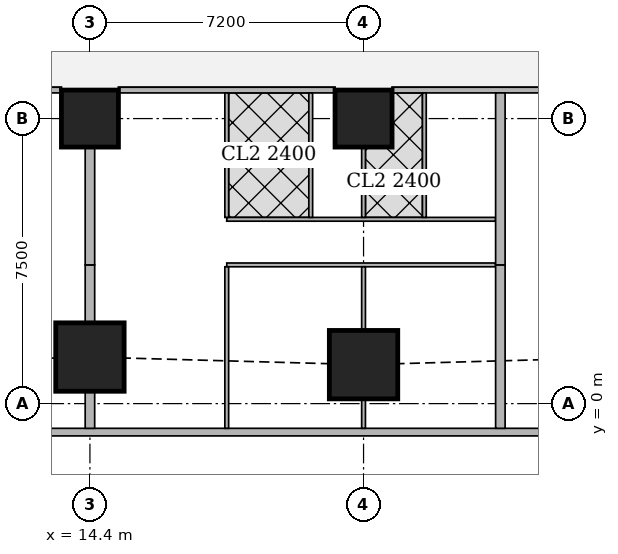
"""IFC4 building model, lengths in metres.
Left out: names, types, materials, properties, quantities, classifications, styles, units other than length and angle.
Written with IfcOpenShell. Run it as: python <this file> out.ifc"""

import sys

from ifc_helpers import new_model, si_unit, direction, frame, frame_2d, origin, origin_2d, place, context, subcontext, project, spatial, rectangle, extrude, element, fill, save


model = new_model("IFC4")
c1 = context("Model", 3, precision=1e-05, world=origin(), true_north=direction((0.0, 1.0)))
c2 = subcontext(c1, "Body", "Model", "MODEL_VIEW")
j1 = project(units=[si_unit("LENGTHUNIT", "METRE"), si_unit("PLANEANGLEUNIT", "RADIAN")], contexts=[c1])
p1 = place(None, origin())
s1 = spatial("IfcSite", under=j1, at=p1, CompositionType="ELEMENT")
p2 = place(p1, origin())
s2 = spatial("IfcBuilding", under=s1, at=p2, CompositionType="ELEMENT")
p3 = place(p2, frame((0.0, 0.0, 147.05)))
s3 = spatial("IfcBuildingStorey", under=s2, at=p3, CompositionType="ELEMENT", Elevation=147.05)
for number, where, z_axis, x_axis in (
    (1, (14.4, 1.225, 0.0), (0.0, 0.0, 1.0), (1.0, 0.0, 0.0)),
    (2, (21.6, 1.025, 0.0), (0.0, 0.0, 1.0), (1.0, 0.0, 0.0)),
):
    element("IfcColumn", number, at=place(p3, frame(where, z_axis=z_axis, x_axis=x_axis)), inside=s3, PredefinedType="COLUMN", context=c2, shape_type="SweptSolid", body=[
        extrude(rectangle(XDim=1.8, YDim=1.8, at=origin_2d()), origin(), (0.0, 0.0, 1.0), 3.75),
    ])
for number, where, z_axis, x_axis in (
    (3, (14.4, 7.5, 0.0), (0.0, 0.0, 1.0), (1.0, 0.0, 0.0)),
    (4, (21.6, 7.5, 0.0), (0.0, 0.0, 1.0), (1.0, 0.0, 0.0)),
):
    element("IfcColumn", number, at=place(p3, frame(where, z_axis=z_axis, x_axis=x_axis)), inside=s3, PredefinedType="COLUMN", context=c2, shape_type="SweptSolid", body=[
        extrude(rectangle(XDim=1.5, YDim=1.5, at=origin_2d()), origin(), (0.0, 0.0, 1.0), 3.75),
    ])
p4 = place(p3, frame((2.163, -0.75, 0.0), z_axis=(0.0, 0.0, 1.0), x_axis=(1.0, 0.0, 0.0)))
e5 = element("IfcWall", 5, at=p4, inside=s3, PredefinedType="SOLIDWALL", context=c2, shape_type="SweptSolid", body=[
    extrude(rectangle(XDim=45.628, YDim=0.2, at=frame_2d((22.814, 0.0))), origin(), (0.0, 0.0, 1.0), 3.5),
])
p5 = place(p4, frame((9.537, 0.0, 0.9)))
e6 = element("IfcOpeningElement", 6, at=p5, cuts=e5, PredefinedType="OPENING", context=c2, shape_type="SweptSolid", body=[
    extrude(rectangle(XDim=1.8, YDim=1.5, at=frame_2d((0.9, 0.75))), frame((0.0, 0.11, 0.0), z_axis=(0.0, -1.0, 0.0), x_axis=(1.0, 0.0, 0.0)), (0.0, 0.0, 1.0), 0.22),
])
p6 = place(p4, frame((13.137, 0.0, 0.9)))
e7 = element("IfcOpeningElement", 7, at=p6, cuts=e5, PredefinedType="OPENING", context=c2, shape_type="SweptSolid", body=[
    extrude(rectangle(XDim=1.8, YDim=1.5, at=frame_2d((0.9, 0.75))), frame((0.0, 0.11, 0.0), z_axis=(0.0, -1.0, 0.0), x_axis=(1.0, 0.0, 0.0)), (0.0, 0.0, 1.0), 0.22),
])
p7 = place(p4, frame((16.737, 0.0, 0.9)))
e8 = element("IfcOpeningElement", 8, at=p7, cuts=e5, PredefinedType="OPENING", context=c2, shape_type="SweptSolid", body=[
    extrude(rectangle(XDim=1.8, YDim=1.5, at=frame_2d((0.9, 0.75))), frame((0.0, 0.11, 0.0), z_axis=(0.0, -1.0, 0.0), x_axis=(1.0, 0.0, 0.0)), (0.0, 0.0, 1.0), 0.22),
])
p8 = place(p4, frame((20.337, 0.0, 0.9)))
e9 = element("IfcOpeningElement", 9, at=p8, cuts=e5, PredefinedType="OPENING", context=c2, shape_type="SweptSolid", body=[
    extrude(rectangle(XDim=1.8, YDim=1.5, at=frame_2d((0.9, 0.75))), frame((0.0, 0.11, 0.0), z_axis=(0.0, -1.0, 0.0), x_axis=(1.0, 0.0, 0.0)), (0.0, 0.0, 1.0), 0.22),
])
p9 = place(p4, frame((23.937, 0.0, 0.9)))
e10 = element("IfcOpeningElement", 10, at=p9, cuts=e5, PredefinedType="OPENING", context=c2, shape_type="SweptSolid", body=[
    extrude(rectangle(XDim=1.8, YDim=1.5, at=frame_2d((0.9, 0.75))), frame((0.0, 0.11, 0.0), z_axis=(0.0, -1.0, 0.0), x_axis=(1.0, 0.0, 0.0)), (0.0, 0.0, 1.0), 0.22),
])
p10 = place(p4, frame((27.537, 0.0, 0.9)))
e11 = element("IfcOpeningElement", 11, at=p10, cuts=e5, PredefinedType="OPENING", context=c2, shape_type="SweptSolid", body=[
    extrude(rectangle(XDim=1.8, YDim=1.5, at=frame_2d((0.9, 0.75))), frame((0.0, 0.11, 0.0), z_axis=(0.0, -1.0, 0.0), x_axis=(1.0, 0.0, 0.0)), (0.0, 0.0, 1.0), 0.22),
])
p11 = place(p4, frame((31.137, 0.0, 0.9)))
e12 = element("IfcOpeningElement", 12, at=p11, cuts=e5, PredefinedType="OPENING", context=c2, shape_type="SweptSolid", body=[
    extrude(rectangle(XDim=1.8, YDim=1.5, at=frame_2d((0.9, 0.75))), frame((0.0, 0.11, 0.0), z_axis=(0.0, -1.0, 0.0), x_axis=(1.0, 0.0, 0.0)), (0.0, 0.0, 1.0), 0.22),
])
p12 = place(p4, frame((34.737, 0.0, 0.9)))
e13 = element("IfcOpeningElement", 13, at=p12, cuts=e5, PredefinedType="OPENING", context=c2, shape_type="SweptSolid", body=[
    extrude(rectangle(XDim=1.8, YDim=1.5, at=frame_2d((0.9, 0.75))), frame((0.0, 0.11, 0.0), z_axis=(0.0, -1.0, 0.0), x_axis=(1.0, 0.0, 0.0)), (0.0, 0.0, 1.0), 0.22),
])
p13 = place(p3, frame((28.049, 8.25, 0.0), z_axis=(0.0, 0.0, 1.0), x_axis=(-1.0, 0.0, 0.0)))
e14 = element("IfcWall", 14, at=p13, inside=s3, PredefinedType="SOLIDWALL", context=c2, shape_type="SweptSolid", body=[
    extrude(rectangle(XDim=5.698, YDim=0.15, at=frame_2d((2.849, 0.0))), origin(), (0.0, 0.0, 1.0), 3.5),
])
p14 = place(p13, frame((0.749, 0.0, 0.0)))
e15 = element("IfcOpeningElement", 15, at=p14, cuts=e14, PredefinedType="OPENING", context=c2, shape_type="SweptSolid", body=[
    extrude(rectangle(XDim=1.0, YDim=2.1, at=frame_2d((0.5, 1.05))), frame((0.0, 0.085, 0.0), z_axis=(0.0, -1.0, 0.0), x_axis=(1.0, 0.0, 0.0)), (0.0, 0.0, 1.0), 0.17),
])
p15 = place(p3, frame((20.849, 8.25, 0.0), z_axis=(0.0, 0.0, 1.0), x_axis=(-1.0, 0.0, 0.0)))
e16 = element("IfcWall", 16, at=p15, inside=s3, PredefinedType="SOLIDWALL", context=c2, shape_type="SweptSolid", body=[
    extrude(rectangle(XDim=5.698, YDim=0.15, at=frame_2d((2.849, 0.0))), origin(), (0.0, 0.0, 1.0), 3.5),
])
p16 = place(p15, frame((3.949, 0.0, 0.0)))
e17 = element("IfcOpeningElement", 17, at=p16, cuts=e16, PredefinedType="OPENING", context=c2, shape_type="SweptSolid", body=[
    extrude(rectangle(XDim=1.0, YDim=2.1, at=frame_2d((0.5, 1.05))), frame((0.0, 0.085, 0.0), z_axis=(0.0, -1.0, 0.0), x_axis=(1.0, 0.0, 0.0)), (0.0, 0.0, 1.0), 0.17),
])
p17 = place(p3, frame((13.649, 8.25, 0.0), z_axis=(0.0, 0.0, 1.0), x_axis=(-1.0, 0.0, 0.0)))
e18 = element("IfcWall", 18, at=p17, inside=s3, PredefinedType="SOLIDWALL", context=c2, shape_type="SweptSolid", body=[
    extrude(rectangle(XDim=5.549, YDim=0.15, at=frame_2d((2.774, 0.0))), origin(), (0.0, 0.0, 1.0), 3.5),
])
p18 = place(p17, frame((0.81, 0.0, 0.0)))
e19 = element("IfcOpeningElement", 19, at=p18, cuts=e18, PredefinedType="OPENING", context=c2, shape_type="SweptSolid", body=[
    extrude(rectangle(XDim=1.0, YDim=2.1, at=frame_2d((0.5, 1.05))), frame((0.0, 0.085, 0.0), z_axis=(0.0, -1.0, 0.0), x_axis=(1.0, 0.0, 0.0)), (0.0, 0.0, 1.0), 0.17),
])
p19 = place(p3, frame((25.075, 3.65, 0.0), z_axis=(0.0, 0.0, 1.0), x_axis=(-1.0, 0.0, 0.0)))
e20 = element("IfcWall", 20, at=p19, inside=s3, PredefinedType="PARTITIONING", context=c2, shape_type="SweptSolid", body=[
    extrude(rectangle(XDim=7.075, YDim=0.1, at=frame_2d((3.538, 0.0))), origin(), (0.0, 0.0, 1.0), 3.5),
])
p20 = place(p19, frame((5.975, 0.0, 0.0)))
e21 = element("IfcOpeningElement", 21, at=p20, cuts=e20, PredefinedType="OPENING", context=c2, shape_type="SweptSolid", body=[
    extrude(rectangle(XDim=0.9, YDim=2.1, at=frame_2d((0.45, 1.05))), frame((0.0, 0.06, 0.0), z_axis=(0.0, -1.0, 0.0), x_axis=(1.0, 0.0, 0.0)), (0.0, 0.0, 1.0), 0.12),
])
p21 = place(p19, frame((2.375, 0.0, 0.0)))
e22 = element("IfcOpeningElement", 22, at=p21, cuts=e20, PredefinedType="OPENING", context=c2, shape_type="SweptSolid", body=[
    extrude(rectangle(XDim=0.9, YDim=2.1, at=frame_2d((0.45, 1.05))), frame((0.0, 0.06, 0.0), z_axis=(0.0, -1.0, 0.0), x_axis=(1.0, 0.0, 0.0)), (0.0, 0.0, 1.0), 0.12),
])
p22 = place(p3, frame((25.075, 4.85, 0.0), z_axis=(0.0, 0.0, 1.0), x_axis=(-1.0, 0.0, 0.0)))
e23 = element("IfcWall", 23, at=p22, inside=s3, PredefinedType="PARTITIONING", context=c2, shape_type="SweptSolid", body=[
    extrude(rectangle(XDim=7.075, YDim=0.1, at=frame_2d((3.538, 0.0))), origin(), (0.0, 0.0, 1.0), 3.5),
])
p23 = place(p22, frame((5.52, 0.0, 0.0)))
e24 = element("IfcOpeningElement", 24, at=p23, cuts=e23, PredefinedType="OPENING", context=c2, shape_type="SweptSolid", body=[
    extrude(rectangle(XDim=0.9, YDim=2.1, at=frame_2d((0.45, 1.05))), frame((0.0, 0.06, 0.0), z_axis=(0.0, -1.0, 0.0), x_axis=(1.0, 0.0, 0.0)), (0.0, 0.0, 1.0), 0.12),
])
p24 = place(p22, frame((2.225, 0.0, 0.0)))
e25 = element("IfcOpeningElement", 25, at=p24, cuts=e23, PredefinedType="OPENING", context=c2, shape_type="SweptSolid", body=[
    extrude(rectangle(XDim=0.9, YDim=2.1, at=frame_2d((0.45, 1.05))), frame((0.0, 0.06, 0.0), z_axis=(0.0, -1.0, 0.0), x_axis=(1.0, 0.0, 0.0)), (0.0, 0.0, 1.0), 0.12),
])
p25 = place(p22, frame((3.72, 0.0, 0.0)))
e26 = element("IfcOpeningElement", 26, at=p25, cuts=e23, PredefinedType="OPENING", context=c2, shape_type="SweptSolid", body=[
    extrude(rectangle(XDim=0.9, YDim=2.1, at=frame_2d((0.45, 1.05))), frame((0.0, 0.06, 0.0), z_axis=(0.0, -1.0, 0.0), x_axis=(1.0, 0.0, 0.0)), (0.0, 0.0, 1.0), 0.12),
])
p26 = place(p22, frame((0.425, 0.0, 0.0)))
e27 = element("IfcOpeningElement", 27, at=p26, cuts=e23, PredefinedType="OPENING", context=c2, shape_type="SweptSolid", body=[
    extrude(rectangle(XDim=0.9, YDim=2.1, at=frame_2d((0.45, 1.05))), frame((0.0, 0.06, 0.0), z_axis=(0.0, -1.0, 0.0), x_axis=(1.0, 0.0, 0.0)), (0.0, 0.0, 1.0), 0.12),
])
p27 = place(p3, frame((18.0, -0.65, 0.0), z_axis=(0.0, 0.0, 1.0), x_axis=(0.0, 1.0, 0.0)))
e28 = element("IfcWall", 28, at=p27, inside=s3, PredefinedType="PARTITIONING", context=c2, shape_type="SweptSolid", body=[
    extrude(rectangle(XDim=4.25, YDim=0.1, at=frame_2d((2.125, 0.0))), origin(), (0.0, 0.0, 1.0), 2.1),
])
p28 = place(p3, frame((21.6, -0.65, 0.0), z_axis=(0.0, 0.0, 1.0), x_axis=(0.0, 1.0, 0.0)))
e29 = element("IfcWall", 29, at=p28, inside=s3, PredefinedType="PARTITIONING", context=c2, shape_type="SweptSolid", body=[
    extrude(rectangle(XDim=0.774, YDim=0.1, at=frame_2d((0.387, 0.0))), origin(), (0.0, 0.0, 1.0), 3.5),
])
p29 = place(p3, frame((21.6, 1.926, 0.0), z_axis=(0.0, 0.0, 1.0), x_axis=(0.0, 1.0, 0.0)))
e30 = element("IfcWall", 30, at=p29, inside=s3, PredefinedType="PARTITIONING", context=c2, shape_type="SweptSolid", body=[
    extrude(rectangle(XDim=1.674, YDim=0.1, at=frame_2d((0.837, 0.0))), origin(), (0.0, 0.0, 1.0), 3.5),
])
p30 = place(p3, frame((18.0, 4.9, 0.0), z_axis=(0.0, 0.0, 1.0), x_axis=(0.0, 1.0, 0.0)))
e31 = element("IfcWall", 31, at=p30, inside=s3, PredefinedType="PARTITIONING", context=c2, shape_type="SweptSolid", body=[
    extrude(rectangle(XDim=3.275, YDim=0.1, at=frame_2d((1.638, 0.0))), origin(), (0.0, 0.0, 1.0), 3.5),
])
p31 = place(p3, frame((21.6, 4.9, 0.0), z_axis=(0.0, 0.0, 1.0), x_axis=(0.0, 1.0, 0.0)))
e32 = element("IfcWall", 32, at=p31, inside=s3, PredefinedType="PARTITIONING", context=c2, shape_type="SweptSolid", body=[
    extrude(rectangle(XDim=1.849, YDim=0.1, at=frame_2d((0.925, 0.0))), origin(), (0.0, 0.0, 1.0), 3.5),
])
for number, where, z_axis, x_axis in (
    (33, (20.21, 4.9, 0.0), (0.0, 0.0, 1.0), (0.0, 1.0, 0.0)),
    (34, (23.2, 4.9, 0.0), (0.0, 0.0, 1.0), (0.0, 1.0, 0.0)),
):
    element("IfcWall", number, at=place(p3, frame(where, z_axis=z_axis, x_axis=x_axis)), inside=s3, PredefinedType="PARTITIONING", context=c2, shape_type="SweptSolid", body=[
        extrude(rectangle(XDim=3.275, YDim=0.1, at=frame_2d((1.638, 0.0))), origin(), (0.0, 0.0, 1.0), 3.5),
    ])
p32 = place(p3, frame((14.4, -0.65, 0.0), z_axis=(0.0, 0.0, 1.0), x_axis=(0.0, 1.0, 0.0)))
e35 = element("IfcWall", 35, at=p32, inside=s3, PredefinedType="SOLIDWALL", context=c2, shape_type="SweptSolid", body=[
    extrude(rectangle(XDim=0.974, YDim=0.25, at=frame_2d((0.487, 0.0))), origin(), (0.0, 0.0, 1.0), 2.1),
])
p33 = place(p3, frame((14.4, 2.126, 0.0), z_axis=(0.0, 0.0, 1.0), x_axis=(0.0, 1.0, 0.0)))
e36 = element("IfcWall", 36, at=p33, inside=s3, PredefinedType="SOLIDWALL", context=c2, shape_type="SweptSolid", body=[
    extrude(rectangle(XDim=1.524, YDim=0.25, at=frame_2d((0.762, 0.0))), origin(), (0.0, 0.0, 1.0), 2.1),
])
p34 = place(p3, frame((14.4, 3.65, 0.0), z_axis=(0.0, 0.0, 1.0), x_axis=(0.0, 1.0, 0.0)))
e37 = element("IfcWall", 37, at=p34, inside=s3, PredefinedType="SOLIDWALL", context=c2, shape_type="SweptSolid", body=[
    extrude(rectangle(XDim=3.099, YDim=0.25, at=frame_2d((1.55, 0.0))), origin(), (0.0, 0.0, 1.0), 3.5),
])
p35 = place(p3, frame((25.2, -0.65, 0.0), z_axis=(0.0, 0.0, 1.0), x_axis=(0.0, 1.0, 0.0)))
e38 = element("IfcWall", 38, at=p35, inside=s3, PredefinedType="SOLIDWALL", context=c2, shape_type="SweptSolid", body=[
    extrude(rectangle(XDim=4.3, YDim=0.25, at=frame_2d((2.15, 0.0))), origin(), (0.0, 0.0, 1.0), 2.1),
])
p36 = place(p3, frame((25.2, 3.65, 0.0), z_axis=(0.0, 0.0, 1.0), x_axis=(0.0, 1.0, 0.0)))
e39 = element("IfcWall", 39, at=p36, inside=s3, PredefinedType="SOLIDWALL", context=c2, shape_type="SweptSolid", body=[
    extrude(rectangle(XDim=4.525, YDim=0.25, at=frame_2d((2.263, 0.0))), origin(), (0.0, 0.0, 1.0), 3.5),
])
p37 = place(p5, origin())
e40 = element("IfcWindow", 40, at=p37, inside=s3, PartitioningType="SINGLE_PANEL", PredefinedType="WINDOW", context=c2, shape_type="SweptSolid", body=[
    extrude(rectangle(XDim=1.8, YDim=1.5, at=frame_2d((0.9, 0.75))), frame((0.0, 0.03, 0.0), z_axis=(0.0, -1.0, 0.0), x_axis=(1.0, 0.0, 0.0)), (0.0, 0.0, 1.0), 0.06),
])
fill(e6, e40)
p38 = place(p6, origin())
e41 = element("IfcWindow", 41, at=p38, inside=s3, PartitioningType="SINGLE_PANEL", PredefinedType="WINDOW", context=c2, shape_type="SweptSolid", body=[
    extrude(rectangle(XDim=1.8, YDim=1.5, at=frame_2d((0.9, 0.75))), frame((0.0, 0.03, 0.0), z_axis=(0.0, -1.0, 0.0), x_axis=(1.0, 0.0, 0.0)), (0.0, 0.0, 1.0), 0.06),
])
fill(e7, e41)
p39 = place(p7, origin())
e42 = element("IfcWindow", 42, at=p39, inside=s3, PartitioningType="SINGLE_PANEL", PredefinedType="WINDOW", context=c2, shape_type="SweptSolid", body=[
    extrude(rectangle(XDim=1.8, YDim=1.5, at=frame_2d((0.9, 0.75))), frame((0.0, 0.03, 0.0), z_axis=(0.0, -1.0, 0.0), x_axis=(1.0, 0.0, 0.0)), (0.0, 0.0, 1.0), 0.06),
])
fill(e8, e42)
p40 = place(p8, origin())
e43 = element("IfcWindow", 43, at=p40, inside=s3, PartitioningType="SINGLE_PANEL", PredefinedType="WINDOW", context=c2, shape_type="SweptSolid", body=[
    extrude(rectangle(XDim=1.8, YDim=1.5, at=frame_2d((0.9, 0.75))), frame((0.0, 0.03, 0.0), z_axis=(0.0, -1.0, 0.0), x_axis=(1.0, 0.0, 0.0)), (0.0, 0.0, 1.0), 0.06),
])
fill(e9, e43)
p41 = place(p9, origin())
e44 = element("IfcWindow", 44, at=p41, inside=s3, PartitioningType="SINGLE_PANEL", PredefinedType="WINDOW", context=c2, shape_type="SweptSolid", body=[
    extrude(rectangle(XDim=1.8, YDim=1.5, at=frame_2d((0.9, 0.75))), frame((0.0, 0.03, 0.0), z_axis=(0.0, -1.0, 0.0), x_axis=(1.0, 0.0, 0.0)), (0.0, 0.0, 1.0), 0.06),
])
fill(e10, e44)
p42 = place(p20, origin())
e45 = element("IfcDoor", 45, at=p42, inside=s3, OperationType="SINGLE_SWING_RIGHT", PredefinedType="DOOR", context=c2, shape_type="SweptSolid", body=[
    extrude(rectangle(XDim=0.9, YDim=2.1, at=frame_2d((0.45, 1.05))), frame((0.0, 0.025, 0.0), z_axis=(0.0, -1.0, 0.0), x_axis=(1.0, 0.0, 0.0)), (0.0, 0.0, 1.0), 0.05),
])
fill(e21, e45)
p43 = place(p21, origin())
e46 = element("IfcDoor", 46, at=p43, inside=s3, OperationType="SINGLE_SWING_RIGHT", PredefinedType="DOOR", context=c2, shape_type="SweptSolid", body=[
    extrude(rectangle(XDim=0.9, YDim=2.1, at=frame_2d((0.45, 1.05))), frame((0.0, 0.025, 0.0), z_axis=(0.0, -1.0, 0.0), x_axis=(1.0, 0.0, 0.0)), (0.0, 0.0, 1.0), 0.05),
])
fill(e22, e46)
p44 = place(p23, origin())
e47 = element("IfcDoor", 47, at=p44, inside=s3, OperationType="SINGLE_SWING_LEFT", PredefinedType="DOOR", context=c2, shape_type="SweptSolid", body=[
    extrude(rectangle(XDim=0.9, YDim=2.1, at=frame_2d((0.45, 1.05))), frame((0.0, 0.025, 0.0), z_axis=(0.0, -1.0, 0.0), x_axis=(1.0, 0.0, 0.0)), (0.0, 0.0, 1.0), 0.05),
])
fill(e24, e47)
p45 = place(p24, origin())
e48 = element("IfcDoor", 48, at=p45, inside=s3, OperationType="SINGLE_SWING_LEFT", PredefinedType="DOOR", context=c2, shape_type="SweptSolid", body=[
    extrude(rectangle(XDim=0.9, YDim=2.1, at=frame_2d((0.45, 1.05))), frame((0.0, 0.025, 0.0), z_axis=(0.0, -1.0, 0.0), x_axis=(1.0, 0.0, 0.0)), (0.0, 0.0, 1.0), 0.05),
])
fill(e25, e48)
p46 = place(p25, origin())
e49 = element("IfcDoor", 49, at=p46, inside=s3, OperationType="SINGLE_SWING_LEFT", PredefinedType="DOOR", context=c2, shape_type="SweptSolid", body=[
    extrude(rectangle(XDim=0.9, YDim=2.1, at=frame_2d((0.45, 1.05))), frame((0.0, 0.025, 0.0), z_axis=(0.0, -1.0, 0.0), x_axis=(1.0, 0.0, 0.0)), (0.0, 0.0, 1.0), 0.05),
])
fill(e26, e49)
p47 = place(p26, origin())
e50 = element("IfcDoor", 50, at=p47, inside=s3, OperationType="SINGLE_SWING_RIGHT", PredefinedType="DOOR", context=c2, shape_type="SweptSolid", body=[
    extrude(rectangle(XDim=0.9, YDim=2.1, at=frame_2d((0.45, 1.05))), frame((0.0, 0.025, 0.0), z_axis=(0.0, -1.0, 0.0), x_axis=(1.0, 0.0, 0.0)), (0.0, 0.0, 1.0), 0.05),
])
fill(e27, e50)
p48 = place(p16, origin())
e51 = element("IfcDoor", 51, at=p48, inside=s3, OperationType="SINGLE_SWING_RIGHT", PredefinedType="DOOR", context=c2, shape_type="SweptSolid", body=[
    extrude(rectangle(XDim=1.0, YDim=2.1, at=frame_2d((0.5, 1.05))), frame((0.0, 0.025, 0.0), z_axis=(0.0, -1.0, 0.0), x_axis=(1.0, 0.0, 0.0)), (0.0, 0.0, 1.0), 0.05),
])
fill(e17, e51)
save(model, sys.argv[1])
